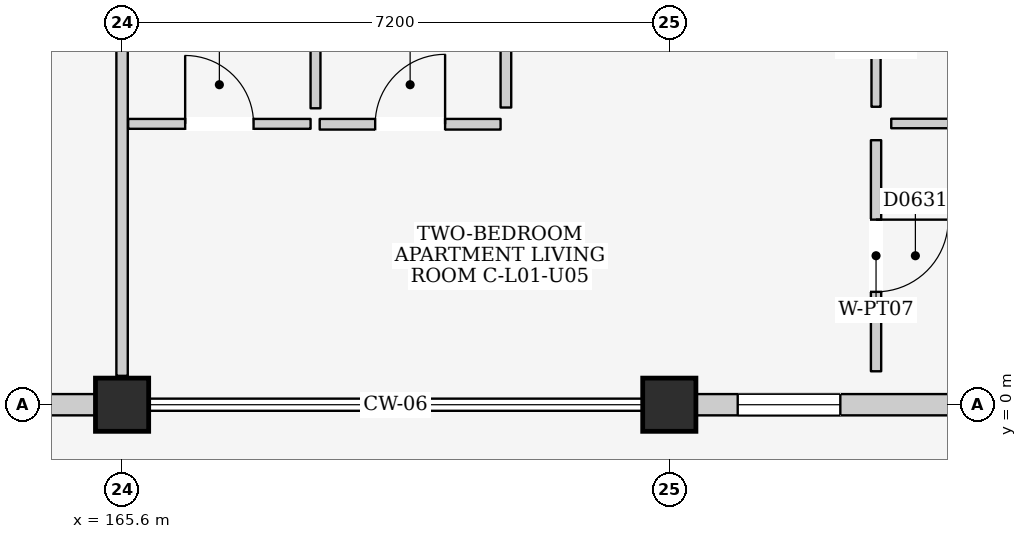
"""IFC4 building model, lengths in metres.
Left out: names, types, materials, properties, quantities, classifications, styles, units other than length and angle.
Written with IfcOpenShell. Run it as: python <this file> out.ifc"""

import sys

from ifc_helpers import new_model, si_unit, direction, frame, frame_2d, origin, origin_2d, place, context, subcontext, project, spatial, rectangle, extrude, element, fill, save


model = new_model("IFC4")
c1 = context("Model", 3, precision=1e-05, world=origin(), true_north=direction((0.0, 1.0)))
c2 = subcontext(c1, "Body", "Model", "MODEL_VIEW")
j1 = project(units=[si_unit("LENGTHUNIT", "METRE"), si_unit("PLANEANGLEUNIT", "RADIAN")], contexts=[c1])
p1 = place(None, origin())
s1 = spatial("IfcSite", under=j1, at=p1, CompositionType="ELEMENT")
p2 = place(p1, origin())
s2 = spatial("IfcBuilding", under=s1, at=p2, CompositionType="ELEMENT")
p3 = place(p2, frame((0.0, 0.0, 4.5)))
s3 = spatial("IfcBuildingStorey", under=s2, at=p3, CompositionType="ELEMENT", Elevation=4.5)
for number, where, z_axis, x_axis in (
    (1, (165.6, 0.0, 0.0), (0.0, 0.0, 1.0), (1.0, 0.0, 0.0)),
    (2, (172.8, 0.0, 0.0), (0.0, 0.0, 1.0), (1.0, 0.0, 0.0)),
):
    element("IfcColumn", number, at=place(p3, frame(where, z_axis=z_axis, x_axis=x_axis)), inside=s3, PredefinedType="COLUMN", context=c2, shape_type="SweptSolid", body=[
        extrude(rectangle(XDim=0.7, YDim=0.7, at=origin_2d()), origin(), (0.0, 0.0, 1.0), 4.5),
    ])
p4 = place(p3, frame((158.75, 0.0, 0.0), z_axis=(0.0, 0.0, 1.0), x_axis=(1.0, 0.0, 0.0)))
e3 = element("IfcWall", 3, at=p4, inside=s3, PredefinedType="ELEMENTEDWALL", context=c2, shape_type="SweptSolid", body=[
    extrude(rectangle(XDim=6.5, YDim=0.28, at=frame_2d((3.25, 0.0))), origin(), (0.0, 0.0, 1.0), 3.715),
])
p5 = place(p4, frame((3.85, 0.0, 0.0)))
e4 = element("IfcOpeningElement", 4, at=p5, cuts=e3, PredefinedType="OPENING", context=c2, shape_type="SweptSolid", body=[
    extrude(rectangle(XDim=1.8, YDim=2.12, at=frame_2d((0.9, 1.06))), frame((0.0, 0.155, 0.0), z_axis=(0.0, -1.0, 0.0), x_axis=(1.0, 0.0, 0.0)), (0.0, 0.0, 1.0), 0.31),
])
p6 = place(p4, frame((0.55, 0.0, 0.9)))
e5 = element("IfcOpeningElement", 5, at=p6, cuts=e3, PredefinedType="OPENING", context=c2, shape_type="SweptSolid", body=[
    extrude(rectangle(XDim=2.1, YDim=1.65, at=frame_2d((1.05, 0.825))), frame((0.0, 0.155, 0.0), z_axis=(0.0, -1.0, 0.0), x_axis=(1.0, 0.0, 0.0)), (0.0, 0.0, 1.0), 0.31),
])
p7 = place(p3, frame((173.15, 0.0, 0.0), z_axis=(0.0, 0.0, 1.0), x_axis=(1.0, 0.0, 0.0)))
e6 = element("IfcWall", 6, at=p7, inside=s3, PredefinedType="ELEMENTEDWALL", context=c2, shape_type="SweptSolid", body=[
    extrude(rectangle(XDim=6.5, YDim=0.28, at=frame_2d((3.25, 0.0))), origin(), (0.0, 0.0, 1.0), 3.715),
])
p8 = place(p7, frame((3.85, 0.0, 0.0)))
e7 = element("IfcOpeningElement", 7, at=p8, cuts=e6, PredefinedType="OPENING", context=c2, shape_type="SweptSolid", body=[
    extrude(rectangle(XDim=1.5, YDim=2.12, at=frame_2d((0.75, 1.06))), frame((0.0, 0.155, 0.0), z_axis=(0.0, -1.0, 0.0), x_axis=(1.0, 0.0, 0.0)), (0.0, 0.0, 1.0), 0.31),
])
p9 = place(p7, frame((0.55, 0.0, 0.9)))
e8 = element("IfcOpeningElement", 8, at=p9, cuts=e6, PredefinedType="OPENING", context=c2, shape_type="SweptSolid", body=[
    extrude(rectangle(XDim=1.35, YDim=1.5, at=frame_2d((0.675, 0.75))), frame((0.0, 0.155, 0.0), z_axis=(0.0, -1.0, 0.0), x_axis=(1.0, 0.0, 0.0)), (0.0, 0.0, 1.0), 0.31),
])
p10 = place(p3, frame((165.6, 0.38, 0.0), z_axis=(0.0, 0.0, 1.0), x_axis=(0.0, 1.0, 0.0)))
e9 = element("IfcWall", 9, at=p10, inside=s3, PredefinedType="PARTITIONING", context=c2, shape_type="SweptSolid", body=[
    extrude(rectangle(XDim=6.44, YDim=0.15, at=frame_2d((3.22, 0.0))), origin(), (0.0, 0.0, 1.0), 3.685),
])
p11 = place(p3, frame((165.68, 3.695, 0.0), z_axis=(0.0, 0.0, 1.0), x_axis=(1.0, 0.0, 0.0)))
e10 = element("IfcWall", 10, at=p11, inside=s3, PredefinedType="PARTITIONING", context=c2, shape_type="SweptSolid", body=[
    extrude(rectangle(XDim=2.4, YDim=0.13, at=frame_2d((1.2, 0.0))), origin(), (0.0, 0.0, 1.0), 4.25),
])
p12 = place(p11, frame((0.75, 0.0, 0.0)))
e11 = element("IfcOpeningElement", 11, at=p12, cuts=e10, PredefinedType="OPENING", context=c2, shape_type="SweptSolid", body=[
    extrude(rectangle(XDim=0.9, YDim=2.1, at=frame_2d((0.45, 1.05))), frame((0.0, 0.08, 0.0), z_axis=(0.0, -1.0, 0.0), x_axis=(1.0, 0.0, 0.0)), (0.0, 0.0, 1.0), 0.16),
])
p13 = place(p3, frame((168.145, 3.9, 0.0), z_axis=(0.0, 0.0, 1.0), x_axis=(0.0, 1.0, 0.0)))
e12 = element("IfcWall", 12, at=p13, inside=s3, PredefinedType="PARTITIONING", context=c2, shape_type="SweptSolid", body=[
    extrude(rectangle(XDim=3.04, YDim=0.13, at=frame_2d((1.52, 0.0))), origin(), (0.0, 0.0, 1.0), 4.25),
])
p14 = place(p3, frame((168.2, 3.69, 0.0), z_axis=(0.0, 0.0, 1.0), x_axis=(1.0, 0.0, 0.0)))
e13 = element("IfcWall", 13, at=p14, inside=s3, PredefinedType="PARTITIONING", context=c2, shape_type="SweptSolid", body=[
    extrude(rectangle(XDim=2.38, YDim=0.14, at=frame_2d((1.19, 0.0))), origin(), (0.0, 0.0, 1.0), 4.25),
])
p15 = place(p14, frame((0.73, 0.0, 0.0)))
e14 = element("IfcOpeningElement", 14, at=p15, cuts=e13, PredefinedType="OPENING", context=c2, shape_type="SweptSolid", body=[
    extrude(rectangle(XDim=0.92, YDim=2.1, at=frame_2d((0.46, 1.05))), frame((0.0, 0.085, 0.0), z_axis=(0.0, -1.0, 0.0), x_axis=(1.0, 0.0, 0.0)), (0.0, 0.0, 1.0), 0.17),
])
p16 = place(p3, frame((170.65, 3.91, 0.0), z_axis=(0.0, 0.0, 1.0), x_axis=(0.0, 1.0, 0.0)))
e15 = element("IfcWall", 15, at=p16, inside=s3, PredefinedType="PARTITIONING", context=c2, shape_type="SweptSolid", body=[
    extrude(rectangle(XDim=3.06, YDim=0.14, at=frame_2d((1.53, 0.0))), origin(), (0.0, 0.0, 1.0), 4.25),
])
p17 = place(p3, frame((175.52, 0.44, 0.0), z_axis=(0.0, 0.0, 1.0), x_axis=(0.0, 1.0, 0.0)))
e16 = element("IfcWall", 16, at=p17, inside=s3, PredefinedType="PARTITIONING", context=c2, shape_type="SweptSolid", body=[
    extrude(rectangle(XDim=3.04, YDim=0.135, at=frame_2d((1.52, 0.0))), origin(), (0.0, 0.0, 1.0), 4.25),
])
p18 = place(p17, frame((1.045, 0.0, 0.0)))
e17 = element("IfcOpeningElement", 17, at=p18, cuts=e16, PredefinedType="OPENING", context=c2, shape_type="SweptSolid", body=[
    extrude(rectangle(XDim=0.95, YDim=2.15, at=frame_2d((0.475, 1.075))), frame((0.0, 0.083, 0.0), z_axis=(0.0, -1.0, 0.0), x_axis=(1.0, 0.0, 0.0)), (0.0, 0.0, 1.0), 0.165),
])
p19 = place(p3, frame((175.72, 3.7, 0.0), z_axis=(0.0, 0.0, 1.0), x_axis=(1.0, 0.0, 0.0)))
e18 = element("IfcWall", 18, at=p19, inside=s3, PredefinedType="PARTITIONING", context=c2, shape_type="SweptSolid", body=[
    extrude(rectangle(XDim=4.06, YDim=0.125, at=frame_2d((2.03, 0.0))), origin(), (0.0, 0.0, 1.0), 4.25),
])
p20 = place(p3, frame((175.52, 3.92, 0.0), z_axis=(0.0, 0.0, 1.0), x_axis=(0.0, 1.0, 0.0)))
e19 = element("IfcWall", 19, at=p20, inside=s3, PredefinedType="PARTITIONING", context=c2, shape_type="SweptSolid", body=[
    extrude(rectangle(XDim=3.04, YDim=0.12, at=frame_2d((1.52, 0.0))), origin(), (0.0, 0.0, 1.0), 4.25),
])
p21 = place(p20, frame((1.04, 0.0, 0.0)))
e20 = element("IfcOpeningElement", 20, at=p21, cuts=e19, PredefinedType="OPENING", context=c2, shape_type="SweptSolid", body=[
    extrude(rectangle(XDim=0.96, YDim=2.15, at=frame_2d((0.48, 1.075))), frame((0.0, 0.075, 0.0), z_axis=(0.0, -1.0, 0.0), x_axis=(1.0, 0.0, 0.0)), (0.0, 0.0, 1.0), 0.15),
])
p22 = place(p9, origin())
e21 = element("IfcWindow", 21, at=p22, inside=s3, PartitioningType="SINGLE_PANEL", PredefinedType="WINDOW", context=c2, shape_type="SweptSolid", body=[
    extrude(rectangle(XDim=1.35, YDim=1.5, at=frame_2d((0.675, 0.75))), frame((0.0, 0.03, 0.0), z_axis=(0.0, -1.0, 0.0), x_axis=(1.0, 0.0, 0.0)), (0.0, 0.0, 1.0), 0.06),
])
fill(e8, e21)
p23 = place(p12, origin())
e22 = element("IfcDoor", 22, at=p23, inside=s3, OperationType="SINGLE_SWING_LEFT", PredefinedType="DOOR", context=c2, shape_type="SweptSolid", body=[
    extrude(rectangle(XDim=0.9, YDim=2.1, at=frame_2d((0.45, 1.05))), frame((0.0, 0.025, 0.0), z_axis=(0.0, -1.0, 0.0), x_axis=(1.0, 0.0, 0.0)), (0.0, 0.0, 1.0), 0.05),
])
fill(e11, e22)
p24 = place(p15, origin())
e23 = element("IfcDoor", 23, at=p24, inside=s3, OperationType="SINGLE_SWING_RIGHT", PredefinedType="DOOR", context=c2, shape_type="SweptSolid", body=[
    extrude(rectangle(XDim=0.92, YDim=2.1, at=frame_2d((0.46, 1.05))), frame((0.0, 0.025, 0.0), z_axis=(0.0, -1.0, 0.0), x_axis=(1.0, 0.0, 0.0)), (0.0, 0.0, 1.0), 0.05),
])
fill(e14, e23)
p25 = place(p18, frame((0.95, 0.0, 0.0), z_axis=(0.0, 0.0, 1.0), x_axis=(-1.0, 0.0, 0.0)))
e24 = element("IfcDoor", 24, at=p25, inside=s3, OperationType="SINGLE_SWING_LEFT", PredefinedType="DOOR", context=c2, shape_type="SweptSolid", body=[
    extrude(rectangle(XDim=0.95, YDim=2.15, at=frame_2d((0.475, 1.075))), frame((0.0, 0.025, 0.0), z_axis=(0.0, -1.0, 0.0), x_axis=(1.0, 0.0, 0.0)), (0.0, 0.0, 1.0), 0.05),
])
fill(e17, e24)
save(model, sys.argv[1])
